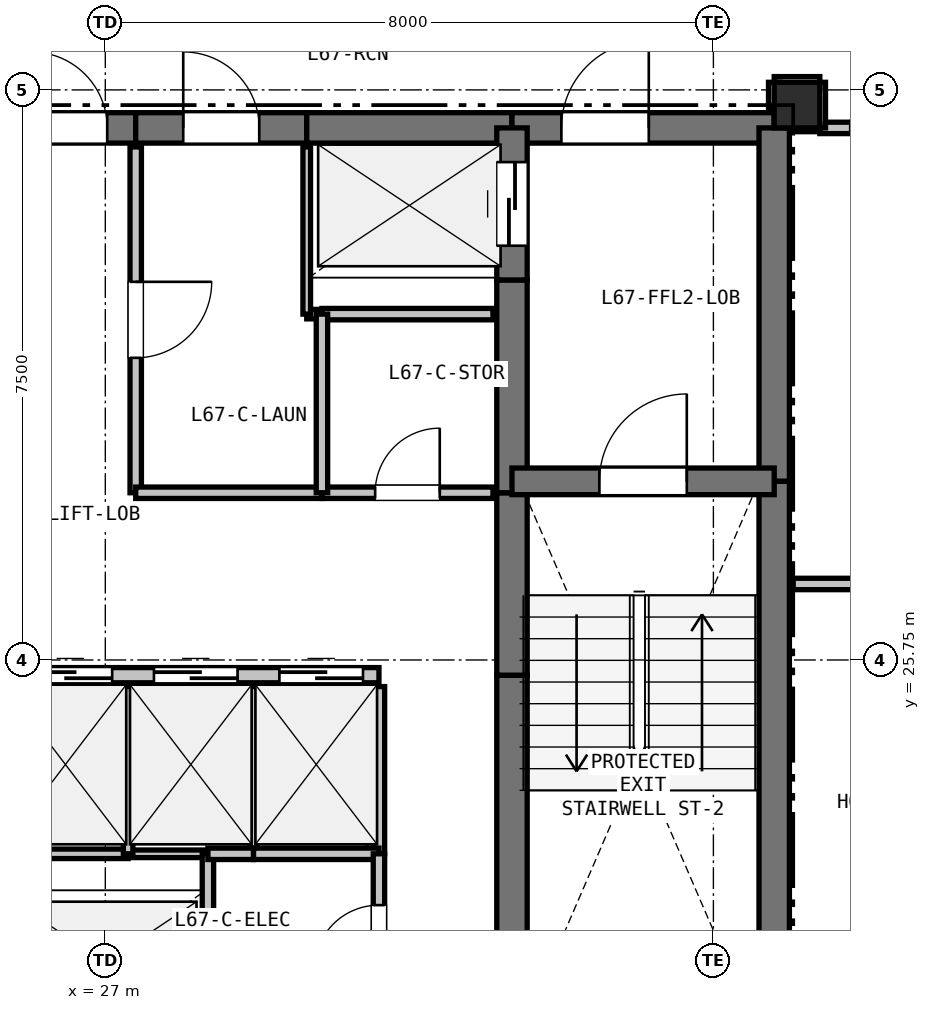
"""IFC4 building model, lengths in metres.
Left out: names, types, materials, properties, quantities, classifications, styles, units other than length and angle.
Written with IfcOpenShell. Run it as: python <this file> out.ifc"""

import sys

from ifc_helpers import new_model, si_unit, direction, frame, frame_2d, origin, origin_2d, place, context, subcontext, project, spatial, rectangle, extrude, element, fill, save


model = new_model("IFC4")
c1 = context("Model", 3, precision=1e-05, world=origin(), true_north=direction((0.0, 1.0)))
c2 = subcontext(c1, "Body", "Model", "MODEL_VIEW")
j1 = project(units=[si_unit("LENGTHUNIT", "METRE"), si_unit("PLANEANGLEUNIT", "RADIAN")], contexts=[c1])
p1 = place(None, origin())
s1 = spatial("IfcSite", under=j1, at=p1, CompositionType="ELEMENT")
p2 = place(p1, origin())
s2 = spatial("IfcBuilding", under=s1, at=p2, CompositionType="ELEMENT")
p3 = place(p2, frame((0.0, 0.0, 239.7)))
s3 = spatial("IfcBuildingStorey", under=s2, at=p3, CompositionType="ELEMENT", Elevation=239.7)
p4 = place(p3, frame((36.1, 33.05, 0.0), z_axis=(0.0, 0.0, 1.0), x_axis=(1.0, 0.0, 0.0)))
e1 = element("IfcColumn", 1, at=p4, inside=s3, PredefinedType="COLUMN", context=c2, shape_type="SweptSolid", body=[
    extrude(rectangle(XDim=0.6, YDim=0.6, at=origin_2d()), origin(), (0.0, 0.0, 1.0), 3.3),
])
p5 = place(p3, frame((25.65, 32.75, 0.0), z_axis=(0.0, 0.0, 1.0), x_axis=(1.0, 0.0, 0.0)))
e2 = element("IfcWall", 2, at=p5, inside=s3, PredefinedType="SHEAR", context=c2, shape_type="SweptSolid", body=[
    extrude(rectangle(XDim=1.75, YDim=0.4, at=frame_2d((0.875, 0.0))), origin(), (0.0, 0.0, 1.0), 3.08),
])
p6 = place(p5, frame((0.375, 0.0, 0.0)))
e3 = element("IfcOpeningElement", 3, at=p6, cuts=e2, PredefinedType="OPENING", context=c2, shape_type="SweptSolid", body=[
    extrude(rectangle(XDim=1.0, YDim=2.15, at=frame_2d((0.5, 1.075))), frame((0.0, 0.21, 0.0), z_axis=(0.0, -1.0, 0.0), x_axis=(1.0, 0.0, 0.0)), (0.0, 0.0, 1.0), 0.42),
])
p7 = place(p3, frame((27.4, 32.75, 0.0), z_axis=(0.0, 0.0, 1.0), x_axis=(1.0, 0.0, 0.0)))
e4 = element("IfcWall", 4, at=p7, inside=s3, PredefinedType="SHEAR", context=c2, shape_type="SweptSolid", body=[
    extrude(rectangle(XDim=2.25, YDim=0.4, at=frame_2d((1.125, 0.0))), origin(), (0.0, 0.0, 1.0), 3.08),
])
p8 = place(p7, frame((0.625, 0.0, 0.0)))
e5 = element("IfcOpeningElement", 5, at=p8, cuts=e4, PredefinedType="OPENING", context=c2, shape_type="SweptSolid", body=[
    extrude(rectangle(XDim=1.0, YDim=2.15, at=frame_2d((0.5, 1.075))), frame((0.0, 0.21, 0.0), z_axis=(0.0, -1.0, 0.0), x_axis=(1.0, 0.0, 0.0)), (0.0, 0.0, 1.0), 0.42),
])
p9 = place(p3, frame((29.65, 32.75, 0.0), z_axis=(0.0, 0.0, 1.0), x_axis=(1.0, 0.0, 0.0)))
e6 = element("IfcWall", 6, at=p9, inside=s3, PredefinedType="SHEAR", context=c2, shape_type="SweptSolid", body=[
    extrude(rectangle(XDim=2.7, YDim=0.4, at=frame_2d((1.35, 0.0))), origin(), (0.0, 0.0, 1.0), 3.08),
])
p10 = place(p3, frame((32.35, 32.75, 0.0), z_axis=(0.0, 0.0, 1.0), x_axis=(1.0, 0.0, 0.0)))
e7 = element("IfcWall", 7, at=p10, inside=s3, PredefinedType="SHEAR", context=c2, shape_type="SweptSolid", body=[
    extrude(rectangle(XDim=3.45, YDim=0.4, at=frame_2d((1.725, 0.0))), origin(), (0.0, 0.0, 1.0), 3.08),
])
p11 = place(p10, frame((0.65, 0.0, 0.0)))
e8 = element("IfcOpeningElement", 8, at=p11, cuts=e7, PredefinedType="OPENING", context=c2, shape_type="SweptSolid", body=[
    extrude(rectangle(XDim=1.15, YDim=2.15, at=frame_2d((0.575, 1.075))), frame((0.0, 0.21, 0.0), z_axis=(0.0, -1.0, 0.0), x_axis=(1.0, 0.0, 0.0)), (0.0, 0.0, 1.0), 0.42),
])
p12 = place(p3, frame((35.8, 32.75, 0.0), z_axis=(0.0, 0.0, 1.0), x_axis=(0.0, -1.0, 0.0)))
e9 = element("IfcWall", 9, at=p12, inside=s3, PredefinedType="SHEAR", context=c2, shape_type="SweptSolid", body=[
    extrude(rectangle(XDim=4.65, YDim=0.4, at=frame_2d((2.325, 0.0))), origin(), (0.0, 0.0, 1.0), 3.08),
])
p13 = place(p3, frame((35.8, 28.1, 0.0), z_axis=(0.0, 0.0, 1.0), x_axis=(0.0, -1.0, 0.0)))
e10 = element("IfcWall", 10, at=p13, inside=s3, PredefinedType="SHEAR", context=c2, shape_type="SweptSolid", body=[
    extrude(rectangle(XDim=7.35, YDim=0.4, at=frame_2d((3.675, 0.0))), origin(), (0.0, 0.0, 1.0), 3.08),
])
p14 = place(p3, frame((32.35, 20.75, 0.0), z_axis=(0.0, 0.0, 1.0), x_axis=(0.0, 1.0, 0.0)))
e11 = element("IfcWall", 11, at=p14, inside=s3, PredefinedType="SHEAR", context=c2, shape_type="SweptSolid", body=[
    extrude(rectangle(XDim=4.8, YDim=0.4, at=frame_2d((2.4, 0.0))), origin(), (0.0, 0.0, 1.0), 3.08),
])
p15 = place(p3, frame((32.35, 25.55, 0.0), z_axis=(0.0, 0.0, 1.0), x_axis=(0.0, 1.0, 0.0)))
e12 = element("IfcWall", 12, at=p15, inside=s3, PredefinedType="SHEAR", context=c2, shape_type="SweptSolid", body=[
    extrude(rectangle(XDim=2.4, YDim=0.4, at=frame_2d((1.2, 0.0))), origin(), (0.0, 0.0, 1.0), 3.08),
])
p16 = place(p3, frame((32.35, 27.95, 0.0), z_axis=(0.0, 0.0, 1.0), x_axis=(0.0, 1.0, 0.0)))
e13 = element("IfcWall", 13, at=p16, inside=s3, PredefinedType="SHEAR", context=c2, shape_type="SweptSolid", body=[
    extrude(rectangle(XDim=2.8, YDim=0.4, at=frame_2d((1.4, 0.0))), origin(), (0.0, 0.0, 1.0), 3.08),
])
p17 = place(p3, frame((32.35, 30.75, 0.0), z_axis=(0.0, 0.0, 1.0), x_axis=(0.0, 1.0, 0.0)))
e14 = element("IfcWall", 14, at=p17, inside=s3, PredefinedType="SHEAR", context=c2, shape_type="SweptSolid", body=[
    extrude(rectangle(XDim=2.0, YDim=0.4, at=frame_2d((1.0, 0.0))), origin(), (0.0, 0.0, 1.0), 3.08),
])
p18 = place(p17, frame((0.45, 0.0, 0.0)))
e15 = element("IfcOpeningElement", 15, at=p18, cuts=e14, PredefinedType="OPENING", context=c2, shape_type="SweptSolid", body=[
    extrude(rectangle(XDim=1.1, YDim=2.15, at=frame_2d((0.55, 1.075))), frame((0.0, 0.21, 0.0), z_axis=(0.0, -1.0, 0.0), x_axis=(1.0, 0.0, 0.0)), (0.0, 0.0, 1.0), 0.42),
])
p19 = place(p3, frame((32.35, 28.1, 0.0), z_axis=(0.0, 0.0, 1.0), x_axis=(1.0, 0.0, 0.0)))
e16 = element("IfcWall", 16, at=p19, inside=s3, PredefinedType="SHEAR", context=c2, shape_type="SweptSolid", body=[
    extrude(rectangle(XDim=3.45, YDim=0.35, at=frame_2d((1.725, 0.0))), origin(), (0.0, 0.0, 1.0), 3.08),
])
p20 = place(p19, frame((1.15, 0.0, 0.0)))
e17 = element("IfcOpeningElement", 17, at=p20, cuts=e16, PredefinedType="OPENING", context=c2, shape_type="SweptSolid", body=[
    extrude(rectangle(XDim=1.15, YDim=2.15, at=frame_2d((0.575, 1.075))), frame((0.0, 0.185, 0.0), z_axis=(0.0, -1.0, 0.0), x_axis=(1.0, 0.0, 0.0)), (0.0, 0.0, 1.0), 0.37),
])
p21 = place(p3, frame((25.65, 25.55, 0.0), z_axis=(0.0, 0.0, 1.0), x_axis=(1.0, 0.0, 0.0)))
e18 = element("IfcWall", 18, at=p21, inside=s3, PredefinedType="PARTITIONING", context=c2, shape_type="SweptSolid", body=[
    extrude(rectangle(XDim=4.95, YDim=0.2, at=frame_2d((2.475, 0.0))), origin(), (0.0, 0.0, 1.0), 3.08),
])
p22 = place(p21, frame((0.34, 0.0, 0.0)))
e19 = element("IfcOpeningElement", 19, at=p22, cuts=e18, PredefinedType="OPENING", context=c2, shape_type="SweptSolid", body=[
    extrude(rectangle(XDim=1.1, YDim=2.15, at=frame_2d((0.55, 1.075))), frame((0.0, 0.11, 0.0), z_axis=(0.0, -1.0, 0.0), x_axis=(1.0, 0.0, 0.0)), (0.0, 0.0, 1.0), 0.22),
])
p23 = place(p21, frame((1.99, 0.0, 0.0)))
e20 = element("IfcOpeningElement", 20, at=p23, cuts=e18, PredefinedType="OPENING", context=c2, shape_type="SweptSolid", body=[
    extrude(rectangle(XDim=1.1, YDim=2.15, at=frame_2d((0.55, 1.075))), frame((0.0, 0.11, 0.0), z_axis=(0.0, -1.0, 0.0), x_axis=(1.0, 0.0, 0.0)), (0.0, 0.0, 1.0), 0.22),
])
p24 = place(p21, frame((3.64, 0.0, 0.0)))
e21 = element("IfcOpeningElement", 21, at=p24, cuts=e18, PredefinedType="OPENING", context=c2, shape_type="SweptSolid", body=[
    extrude(rectangle(XDim=1.1, YDim=2.15, at=frame_2d((0.55, 1.075))), frame((0.0, 0.11, 0.0), z_axis=(0.0, -1.0, 0.0), x_axis=(1.0, 0.0, 0.0)), (0.0, 0.0, 1.0), 0.22),
])
p25 = place(p3, frame((25.9, 23.2, 0.0), z_axis=(0.0, 0.0, 1.0), x_axis=(1.0, 0.0, 0.0)))
e22 = element("IfcWall", 22, at=p25, inside=s3, PredefinedType="PARTITIONING", context=c2, shape_type="SweptSolid", body=[
    extrude(rectangle(XDim=1.4, YDim=0.125, at=frame_2d((0.7, 0.0))), origin(), (0.0, 0.0, 1.0), 3.08),
])
p26 = place(p3, frame((27.3, 23.2, 0.0), z_axis=(0.0, 0.0, 1.0), x_axis=(1.0, 0.0, 0.0)))
e23 = element("IfcWall", 23, at=p26, inside=s3, PredefinedType="PARTITIONING", context=c2, shape_type="SweptSolid", body=[
    extrude(rectangle(XDim=1.05, YDim=0.1, at=frame_2d((0.525, 0.0))), origin(), (0.0, 0.0, 1.0), 3.08),
])
p27 = place(p3, frame((28.35, 23.2, 0.0), z_axis=(0.0, 0.0, 1.0), x_axis=(0.0, -1.0, 0.0)))
e24 = element("IfcWall", 24, at=p27, inside=s3, PredefinedType="PARTITIONING", context=c2, shape_type="SweptSolid", body=[
    extrude(rectangle(XDim=2.2, YDim=0.15, at=frame_2d((1.1, 0.0))), origin(), (0.0, 0.0, 1.0), 3.08),
])
p28 = place(p3, frame((32.1, 30.3, 0.0), z_axis=(0.0, 0.0, 1.0), x_axis=(-1.0, 0.0, 0.0)))
e25 = element("IfcWall", 25, at=p28, inside=s3, PredefinedType="PARTITIONING", context=c2, shape_type="SweptSolid", body=[
    extrude(rectangle(XDim=2.25, YDim=0.15, at=frame_2d((1.125, 0.0))), origin(), (0.0, 0.0, 1.0), 3.08),
])
p29 = place(p3, frame((29.85, 30.3, 0.0), z_axis=(0.0, 0.0, 1.0), x_axis=(-1.0, 0.0, 0.0)))
e26 = element("IfcWall", 26, at=p29, inside=s3, PredefinedType="PARTITIONING", context=c2, shape_type="SweptSolid", body=[
    extrude(rectangle(XDim=0.2, YDim=0.125, at=frame_2d((0.1, 0.0))), origin(), (0.0, 0.0, 1.0), 3.08),
])
p30 = place(p3, frame((29.65, 30.3, 0.0), z_axis=(0.0, 0.0, 1.0), x_axis=(0.0, 1.0, 0.0)))
e27 = element("IfcWall", 27, at=p30, inside=s3, PredefinedType="PARTITIONING", context=c2, shape_type="SweptSolid", body=[
    extrude(rectangle(XDim=2.2, YDim=0.1, at=frame_2d((1.1, 0.0))), origin(), (0.0, 0.0, 1.0), 3.08),
])
p31 = place(p3, frame((27.3, 25.4, 0.0), z_axis=(0.0, 0.0, 1.0), x_axis=(0.0, -1.0, 0.0)))
e28 = element("IfcWall", 28, at=p31, inside=s3, PredefinedType="PARTITIONING", context=c2, shape_type="SweptSolid", body=[
    extrude(rectangle(XDim=2.2, YDim=0.125, at=frame_2d((1.1, 0.0))), origin(), (0.0, 0.0, 1.0), 3.08),
])
p32 = place(p3, frame((28.95, 25.4, 0.0), z_axis=(0.0, 0.0, 1.0), x_axis=(0.0, -1.0, 0.0)))
e29 = element("IfcWall", 29, at=p32, inside=s3, PredefinedType="PARTITIONING", context=c2, shape_type="SweptSolid", body=[
    extrude(rectangle(XDim=2.2, YDim=0.1, at=frame_2d((1.1, 0.0))), origin(), (0.0, 0.0, 1.0), 3.08),
])
p33 = place(p3, frame((28.95, 23.2, 0.0), z_axis=(0.0, 0.0, 1.0), x_axis=(-1.0, 0.0, 0.0)))
e30 = element("IfcWall", 30, at=p33, inside=s3, PredefinedType="PARTITIONING", context=c2, shape_type="SweptSolid", body=[
    extrude(rectangle(XDim=0.6, YDim=0.15, at=frame_2d((0.3, 0.0))), origin(), (0.0, 0.0, 1.0), 3.08),
])
p34 = place(p3, frame((30.6, 25.4, 0.0), z_axis=(0.0, 0.0, 1.0), x_axis=(0.0, -1.0, 0.0)))
e31 = element("IfcWall", 31, at=p34, inside=s3, PredefinedType="PARTITIONING", context=c2, shape_type="SweptSolid", body=[
    extrude(rectangle(XDim=2.2, YDim=0.15, at=frame_2d((1.1, 0.0))), origin(), (0.0, 0.0, 1.0), 3.08),
])
p35 = place(p3, frame((30.6, 23.2, 0.0), z_axis=(0.0, 0.0, 1.0), x_axis=(-1.0, 0.0, 0.0)))
e32 = element("IfcWall", 32, at=p35, inside=s3, PredefinedType="PARTITIONING", context=c2, shape_type="SweptSolid", body=[
    extrude(rectangle(XDim=1.65, YDim=0.15, at=frame_2d((0.825, 0.0))), origin(), (0.0, 0.0, 1.0), 3.08),
])
p36 = place(p3, frame((30.6, 21.0, 0.0), z_axis=(0.0, 0.0, 1.0), x_axis=(0.0, 1.0, 0.0)))
e33 = element("IfcWall", 33, at=p36, inside=s3, PredefinedType="PARTITIONING", context=c2, shape_type="SweptSolid", body=[
    extrude(rectangle(XDim=2.2, YDim=0.15, at=frame_2d((1.1, 0.0))), origin(), (0.0, 0.0, 1.0), 3.08),
])
p37 = place(p36, frame((0.675, 0.0, 0.0)))
e34 = element("IfcOpeningElement", 34, at=p37, cuts=e33, PredefinedType="OPENING", context=c2, shape_type="SweptSolid", body=[
    extrude(rectangle(XDim=0.85, YDim=2.1, at=frame_2d((0.425, 1.05))), frame((0.0, 0.085, 0.0), z_axis=(0.0, -1.0, 0.0), x_axis=(1.0, 0.0, 0.0)), (0.0, 0.0, 1.0), 0.17),
])
p38 = place(p3, frame((27.4, 32.5, 0.0), z_axis=(0.0, 0.0, 1.0), x_axis=(0.0, -1.0, 0.0)))
e35 = element("IfcWall", 35, at=p38, inside=s3, PredefinedType="PARTITIONING", context=c2, shape_type="SweptSolid", body=[
    extrude(rectangle(XDim=4.55, YDim=0.15, at=frame_2d((2.275, 0.0))), origin(), (0.0, 0.0, 1.0), 3.08),
])
p39 = place(p38, frame((1.775, 0.0, 0.0)))
e36 = element("IfcOpeningElement", 36, at=p39, cuts=e35, PredefinedType="OPENING", context=c2, shape_type="SweptSolid", body=[
    extrude(rectangle(XDim=1.0, YDim=2.15, at=frame_2d((0.5, 1.075))), frame((0.0, 0.085, 0.0), z_axis=(0.0, -1.0, 0.0), x_axis=(1.0, 0.0, 0.0)), (0.0, 0.0, 1.0), 0.17),
])
p40 = place(p3, frame((27.4, 27.95, 0.0), z_axis=(0.0, 0.0, 1.0), x_axis=(1.0, 0.0, 0.0)))
e37 = element("IfcWall", 37, at=p40, inside=s3, PredefinedType="PARTITIONING", context=c2, shape_type="SweptSolid", body=[
    extrude(rectangle(XDim=2.45, YDim=0.15, at=frame_2d((1.225, 0.0))), origin(), (0.0, 0.0, 1.0), 3.08),
])
p41 = place(p3, frame((29.85, 27.95, 0.0), z_axis=(0.0, 0.0, 1.0), x_axis=(1.0, 0.0, 0.0)))
e38 = element("IfcWall", 38, at=p41, inside=s3, PredefinedType="PARTITIONING", context=c2, shape_type="SweptSolid", body=[
    extrude(rectangle(XDim=2.25, YDim=0.15, at=frame_2d((1.125, 0.0))), origin(), (0.0, 0.0, 1.0), 3.08),
])
p42 = place(p41, frame((0.7, 0.0, 0.0)))
e39 = element("IfcOpeningElement", 39, at=p42, cuts=e38, PredefinedType="OPENING", context=c2, shape_type="SweptSolid", body=[
    extrude(rectangle(XDim=0.85, YDim=2.1, at=frame_2d((0.425, 1.05))), frame((0.0, 0.085, 0.0), z_axis=(0.0, -1.0, 0.0), x_axis=(1.0, 0.0, 0.0)), (0.0, 0.0, 1.0), 0.17),
])
p43 = place(p3, frame((38.2, 32.75, 0.0), z_axis=(0.0, 0.0, 1.0), x_axis=(-1.0, 0.0, 0.0)))
e40 = element("IfcWall", 40, at=p43, inside=s3, PredefinedType="PARTITIONING", context=c2, shape_type="SweptSolid", body=[
    extrude(rectangle(XDim=1.8, YDim=0.15, at=frame_2d((0.9, 0.0))), origin(), (0.0, 0.0, 1.0), 3.08),
])
p44 = place(p43, frame((0.4, 0.0, 0.0)))
e41 = element("IfcOpeningElement", 41, at=p44, cuts=e40, PredefinedType="OPENING", context=c2, shape_type="SweptSolid", body=[
    extrude(rectangle(XDim=1.0, YDim=2.15, at=frame_2d((0.5, 1.075))), frame((0.0, 0.085, 0.0), z_axis=(0.0, -1.0, 0.0), x_axis=(1.0, 0.0, 0.0)), (0.0, 0.0, 1.0), 0.17),
])
p45 = place(p3, frame((36.4, 32.75, 0.0), z_axis=(0.0, 0.0, 1.0), x_axis=(0.0, 1.0, 0.0)))
e42 = element("IfcWall", 42, at=p45, inside=s3, PredefinedType="PARTITIONING", context=c2, shape_type="SweptSolid", body=[
    extrude(rectangle(XDim=0.6, YDim=0.15, at=frame_2d((0.3, 0.0))), origin(), (0.0, 0.0, 1.0), 2.528),
])
p46 = place(p3, frame((36.4, 33.35, 0.0), z_axis=(0.0, 0.0, 1.0), x_axis=(-1.0, 0.0, 0.0)))
e43 = element("IfcWall", 43, at=p46, inside=s3, PredefinedType="PARTITIONING", context=c2, shape_type="SweptSolid", body=[
    extrude(rectangle(XDim=0.6, YDim=0.15, at=frame_2d((0.3, 0.0))), origin(), (0.0, 0.0, 1.0), 2.528),
])
p47 = place(p3, frame((35.8, 33.35, 0.0), z_axis=(0.0, 0.0, 1.0), x_axis=(0.0, -1.0, 0.0)))
e44 = element("IfcWall", 44, at=p47, inside=s3, PredefinedType="PARTITIONING", context=c2, shape_type="SweptSolid", body=[
    extrude(rectangle(XDim=0.35, YDim=0.15, at=frame_2d((0.175, 0.0))), origin(), (0.0, 0.0, 1.0), 2.605),
])
p48 = place(p3, frame((29.85, 30.3, 0.0), z_axis=(0.0, 0.0, 1.0), x_axis=(0.0, -1.0, 0.0)))
e45 = element("IfcWall", 45, at=p48, inside=s3, PredefinedType="PARTITIONING", context=c2, shape_type="SweptSolid", body=[
    extrude(rectangle(XDim=2.35, YDim=0.15, at=frame_2d((1.175, 0.0))), origin(), (0.0, 0.0, 1.0), 3.08),
])
p49 = place(p3, frame((36.05, 32.75, 0.0), z_axis=(0.0, 0.0, 1.0), x_axis=(1.0, 0.0, 0.0)))
e46 = element("IfcWall", 46, at=p49, inside=s3, PredefinedType="PARTITIONING", context=c2, shape_type="SweptSolid", body=[
    extrude(rectangle(XDim=0.35, YDim=0.1, at=frame_2d((0.175, 0.0))), origin(), (0.0, 0.0, 1.0), 2.605),
])
p50 = place(p3, frame((39.703, 26.75, 0.0), z_axis=(0.0, 0.0, 1.0), x_axis=(-1.0, 0.0, 0.0)))
e47 = element("IfcWall", 47, at=p50, inside=s3, PredefinedType="PARTITIONING", context=c2, shape_type="SweptSolid", body=[
    extrude(rectangle(XDim=3.653, YDim=0.15, at=frame_2d((1.826, 0.0))), origin(), (0.0, 0.0, 1.0), 2.365),
])
p51 = place(p22, origin())
e48 = element("IfcDoor", 48, at=p51, inside=s3, OperationType="SLIDING_TO_LEFT", PredefinedType="DOOR", context=c2, shape_type="SweptSolid", body=[
    extrude(rectangle(XDim=1.1, YDim=2.15, at=frame_2d((0.55, 1.075))), frame((0.0, 0.025, 0.0), z_axis=(0.0, -1.0, 0.0), x_axis=(1.0, 0.0, 0.0)), (0.0, 0.0, 1.0), 0.05),
])
fill(e19, e48)
p52 = place(p23, origin())
e49 = element("IfcDoor", 49, at=p52, inside=s3, OperationType="SLIDING_TO_LEFT", PredefinedType="DOOR", context=c2, shape_type="SweptSolid", body=[
    extrude(rectangle(XDim=1.1, YDim=2.15, at=frame_2d((0.55, 1.075))), frame((0.0, 0.025, 0.0), z_axis=(0.0, -1.0, 0.0), x_axis=(1.0, 0.0, 0.0)), (0.0, 0.0, 1.0), 0.05),
])
fill(e20, e49)
p53 = place(p24, origin())
e50 = element("IfcDoor", 50, at=p53, inside=s3, OperationType="SLIDING_TO_LEFT", PredefinedType="DOOR", context=c2, shape_type="SweptSolid", body=[
    extrude(rectangle(XDim=1.1, YDim=2.15, at=frame_2d((0.55, 1.075))), frame((0.0, 0.025, 0.0), z_axis=(0.0, -1.0, 0.0), x_axis=(1.0, 0.0, 0.0)), (0.0, 0.0, 1.0), 0.05),
])
fill(e21, e50)
p54 = place(p6, origin())
e51 = element("IfcDoor", 51, at=p54, inside=s3, OperationType="SINGLE_SWING_LEFT", PredefinedType="DOOR", context=c2, shape_type="SweptSolid", body=[
    extrude(rectangle(XDim=1.0, YDim=2.15, at=frame_2d((0.5, 1.075))), frame((0.0, 0.025, 0.0), z_axis=(0.0, -1.0, 0.0), x_axis=(1.0, 0.0, 0.0)), (0.0, 0.0, 1.0), 0.05),
])
fill(e3, e51)
p55 = place(p18, origin())
e52 = element("IfcDoor", 52, at=p55, inside=s3, OperationType="SLIDING_TO_LEFT", PredefinedType="DOOR", context=c2, shape_type="SweptSolid", body=[
    extrude(rectangle(XDim=1.1, YDim=2.15, at=frame_2d((0.55, 1.075))), frame((0.0, 0.025, 0.0), z_axis=(0.0, -1.0, 0.0), x_axis=(1.0, 0.0, 0.0)), (0.0, 0.0, 1.0), 0.05),
])
fill(e15, e52)
p56 = place(p20, origin())
e53 = element("IfcDoor", 53, at=p56, inside=s3, OperationType="SINGLE_SWING_RIGHT", PredefinedType="DOOR", context=c2, shape_type="SweptSolid", body=[
    extrude(rectangle(XDim=1.15, YDim=2.15, at=frame_2d((0.575, 1.075))), frame((0.0, 0.025, 0.0), z_axis=(0.0, -1.0, 0.0), x_axis=(1.0, 0.0, 0.0)), (0.0, 0.0, 1.0), 0.05),
])
fill(e17, e53)
p57 = place(p11, origin())
e54 = element("IfcDoor", 54, at=p57, inside=s3, OperationType="SINGLE_SWING_RIGHT", PredefinedType="DOOR", context=c2, shape_type="SweptSolid", body=[
    extrude(rectangle(XDim=1.15, YDim=2.15, at=frame_2d((0.575, 1.075))), frame((0.0, 0.025, 0.0), z_axis=(0.0, -1.0, 0.0), x_axis=(1.0, 0.0, 0.0)), (0.0, 0.0, 1.0), 0.05),
])
fill(e8, e54)
p58 = place(p39, origin())
e55 = element("IfcDoor", 55, at=p58, inside=s3, OperationType="SINGLE_SWING_LEFT", PredefinedType="DOOR", context=c2, shape_type="SweptSolid", body=[
    extrude(rectangle(XDim=1.0, YDim=2.15, at=frame_2d((0.5, 1.075))), frame((0.0, 0.025, 0.0), z_axis=(0.0, -1.0, 0.0), x_axis=(1.0, 0.0, 0.0)), (0.0, 0.0, 1.0), 0.05),
])
fill(e36, e55)
p59 = place(p42, origin())
e56 = element("IfcDoor", 56, at=p59, inside=s3, OperationType="SINGLE_SWING_RIGHT", PredefinedType="DOOR", context=c2, shape_type="SweptSolid", body=[
    extrude(rectangle(XDim=0.85, YDim=2.1, at=frame_2d((0.425, 1.05))), frame((0.0, 0.025, 0.0), z_axis=(0.0, -1.0, 0.0), x_axis=(1.0, 0.0, 0.0)), (0.0, 0.0, 1.0), 0.05),
])
fill(e39, e56)
p60 = place(p37, origin())
e57 = element("IfcDoor", 57, at=p60, inside=s3, OperationType="SINGLE_SWING_LEFT", PredefinedType="DOOR", context=c2, shape_type="SweptSolid", body=[
    extrude(rectangle(XDim=0.85, YDim=2.1, at=frame_2d((0.425, 1.05))), frame((0.0, 0.025, 0.0), z_axis=(0.0, -1.0, 0.0), x_axis=(1.0, 0.0, 0.0)), (0.0, 0.0, 1.0), 0.05),
])
fill(e34, e57)
p61 = place(p8, origin())
e58 = element("IfcDoor", 58, at=p61, inside=s3, OperationType="SINGLE_SWING_LEFT", PredefinedType="DOOR", context=c2, shape_type="SweptSolid", body=[
    extrude(rectangle(XDim=1.0, YDim=2.15, at=frame_2d((0.5, 1.075))), frame((0.0, 0.025, 0.0), z_axis=(0.0, -1.0, 0.0), x_axis=(1.0, 0.0, 0.0)), (0.0, 0.0, 1.0), 0.05),
])
fill(e5, e58)
save(model, sys.argv[1])
